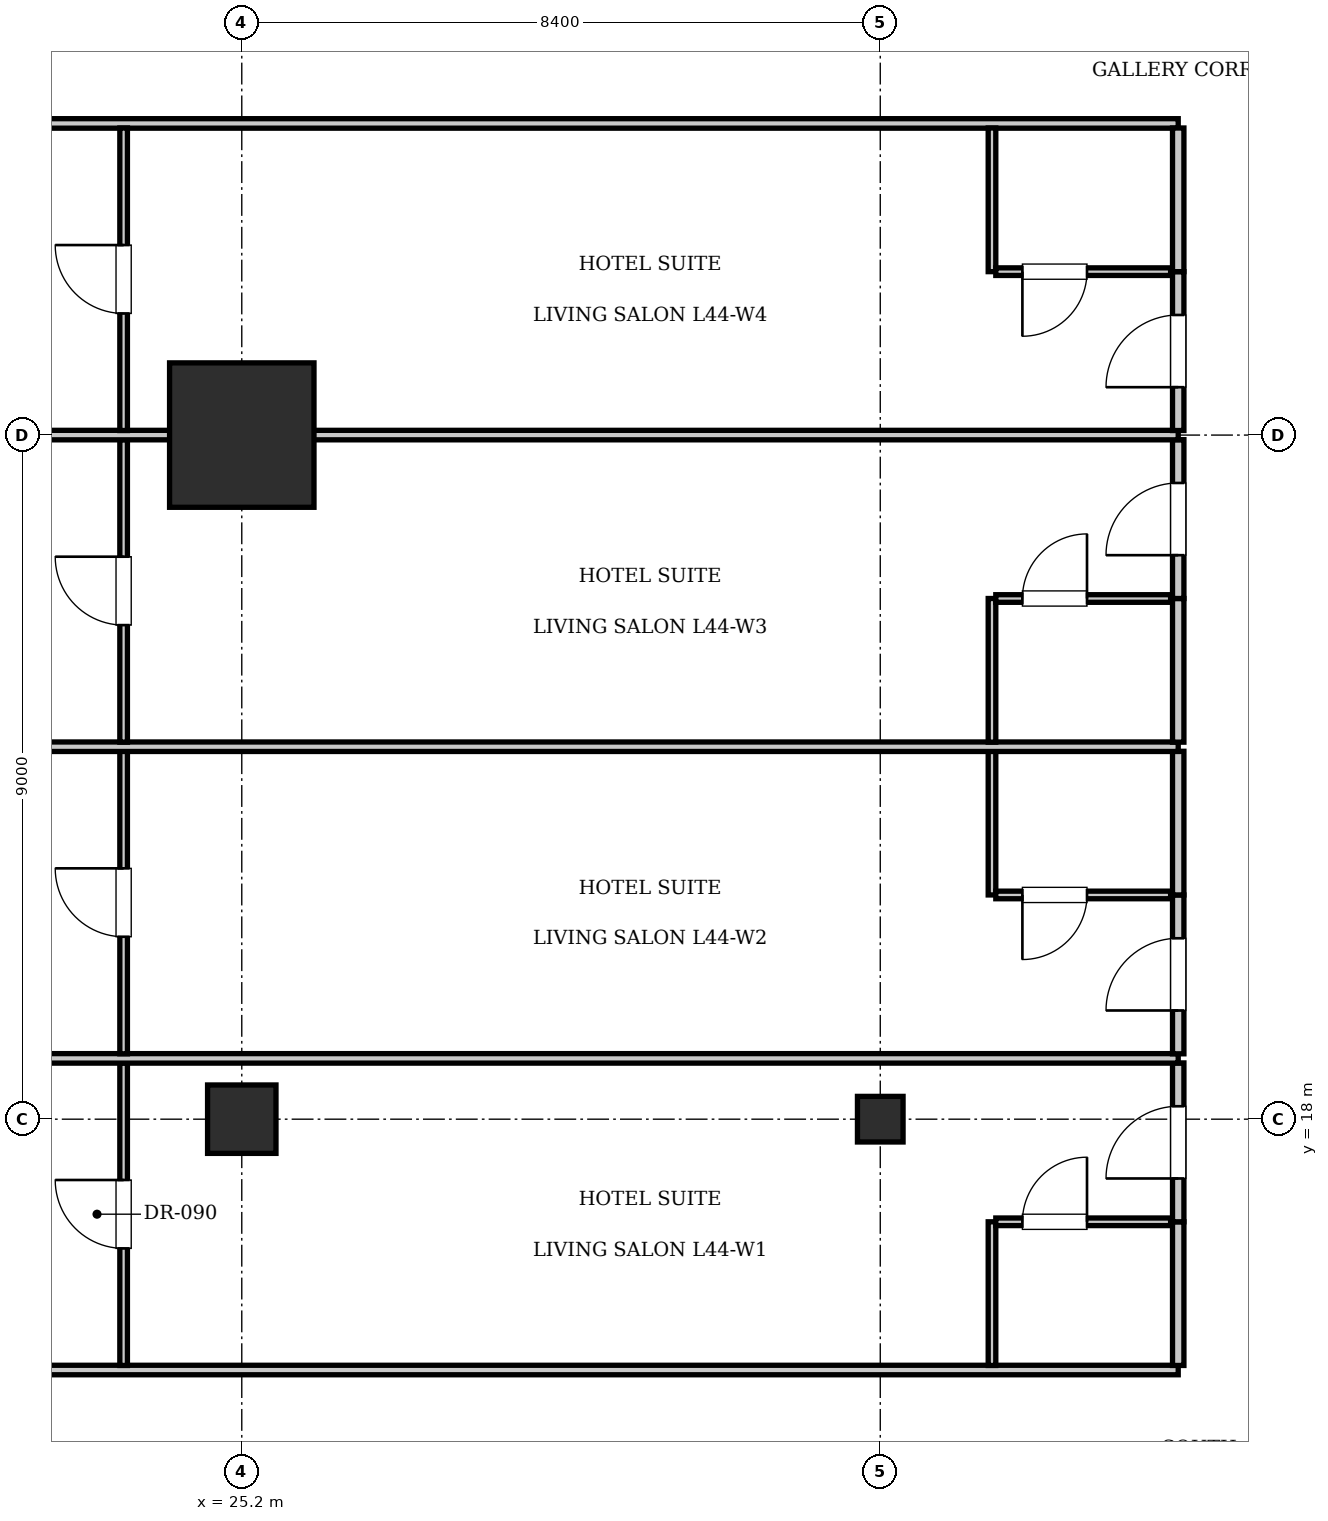
"""IFC4 building model, lengths in metres.
Left out: names, types, materials, properties, quantities, classifications, styles, units other than length and angle.
Written with IfcOpenShell. Run it as: python <this file> out.ifc"""

import sys

from ifc_helpers import new_model, si_unit, direction, frame, frame_2d, origin, origin_2d, place, context, subcontext, project, spatial, rectangle, i_section, extrude, element, fill, save


model = new_model("IFC4")
c1 = context("Model", 3, precision=1e-05, world=origin(), true_north=direction((0.0, 1.0)))
c2 = subcontext(c1, "Body", "Model", "MODEL_VIEW")
j1 = project(units=[si_unit("LENGTHUNIT", "METRE"), si_unit("PLANEANGLEUNIT", "RADIAN")], contexts=[c1])
p1 = place(None, origin())
s1 = spatial("IfcSite", under=j1, at=p1, CompositionType="ELEMENT")
p2 = place(p1, origin())
s2 = spatial("IfcBuilding", under=s1, at=p2, CompositionType="ELEMENT")
p3 = place(p2, frame((0.0, 0.0, 181.3)))
s3 = spatial("IfcBuildingStorey", under=s2, at=p3, CompositionType="ELEMENT", Elevation=181.3)
p4 = place(p3, frame((25.2, 27.0, 0.0), z_axis=(0.0, 0.0, 1.0), x_axis=(1.0, 0.0, 0.0)))
e1 = element("IfcColumn", 1, at=p4, inside=s3, PredefinedType="COLUMN", context=c2, shape_type="SweptSolid", body=[
    extrude(rectangle(XDim=1.9, YDim=1.9, at=origin_2d()), origin(), (0.0, 0.0, 1.0), 3.85),
])
p5 = place(p3, frame((25.2, 18.0, 0.0), z_axis=(0.0, 0.0, 1.0), x_axis=(1.0, 0.0, 0.0)))
e2 = element("IfcColumn", 2, at=p5, inside=s3, PredefinedType="COLUMN", context=c2, shape_type="SweptSolid", body=[
    extrude(rectangle(XDim=0.9, YDim=0.9, at=origin_2d()), origin(), (0.0, 0.0, 1.0), 3.85),
])
p6 = place(p3, frame((33.6, 18.0, 0.0), z_axis=(0.0, 0.0, 1.0), x_axis=(1.0, 0.0, 0.0)))
e3 = element("IfcColumn", 3, at=p6, inside=s3, PredefinedType="COLUMN", context=c2, shape_type="SweptSolid", body=[
    extrude(i_section(OverallWidth=0.6, OverallDepth=0.6, WebThickness=0.025, FlangeThickness=0.038, at=origin_2d()), origin(), (0.0, 0.0, 1.0), 3.85),
])
for number, where, z_axis, x_axis in (
    (4, (13.2, 14.7, 0.0), (0.0, 0.0, 1.0), (1.0, 0.0, 0.0)),
    (5, (13.2, 31.1, 0.0), (0.0, 0.0, 1.0), (1.0, 0.0, 0.0)),
):
    element("IfcWall", number, at=place(p3, frame(where, z_axis=z_axis, x_axis=x_axis)), inside=s3, PredefinedType="PARTITIONING", context=c2, shape_type="SweptSolid", body=[
        extrude(rectangle(XDim=24.32, YDim=0.125, at=frame_2d((12.16, 0.0))), origin(), (0.0, 0.0, 1.0), 3.61),
    ])
p7 = place(p3, frame((37.52, 14.76, 0.0), z_axis=(0.0, 0.0, 1.0), x_axis=(0.0, 1.0, 0.0)))
e6 = element("IfcWall", 6, at=p7, inside=s3, PredefinedType="PARTITIONING", context=c2, shape_type="SweptSolid", body=[
    extrude(rectangle(XDim=1.89, YDim=0.15, at=frame_2d((0.945, 0.0))), origin(), (0.0, 0.0, 1.0), 3.61),
])
p8 = place(p3, frame((37.52, 16.65, 0.0), z_axis=(0.0, 0.0, 1.0), x_axis=(0.0, 1.0, 0.0)))
e7 = element("IfcWall", 7, at=p8, inside=s3, PredefinedType="PARTITIONING", context=c2, shape_type="SweptSolid", body=[
    extrude(rectangle(XDim=2.09, YDim=0.15, at=frame_2d((1.045, 0.0))), origin(), (0.0, 0.0, 1.0), 3.61),
])
p9 = place(p8, frame((0.57, 0.0, 0.0)))
e8 = element("IfcOpeningElement", 8, at=p9, cuts=e7, PredefinedType="OPENING", context=c2, shape_type="SweptSolid", body=[
    extrude(rectangle(XDim=0.95, YDim=2.15, at=frame_2d((0.475, 1.075))), frame((0.0, 0.085, 0.0), z_axis=(0.0, -1.0, 0.0), x_axis=(1.0, 0.0, 0.0)), (0.0, 0.0, 1.0), 0.17),
])
p10 = place(p3, frame((35.07, 14.76, 0.0), z_axis=(0.0, 0.0, 1.0), x_axis=(0.0, 1.0, 0.0)))
e9 = element("IfcWall", 9, at=p10, inside=s3, PredefinedType="PARTITIONING", context=c2, shape_type="SweptSolid", body=[
    extrude(rectangle(XDim=1.89, YDim=0.1, at=frame_2d((0.945, 0.0))), origin(), (0.0, 0.0, 1.0), 3.61),
])
p11 = place(p3, frame((35.12, 16.65, 0.0), z_axis=(0.0, 0.0, 1.0), x_axis=(1.0, 0.0, 0.0)))
e10 = element("IfcWall", 10, at=p11, inside=s3, PredefinedType="PARTITIONING", context=c2, shape_type="SweptSolid", body=[
    extrude(rectangle(XDim=2.3, YDim=0.1, at=frame_2d((1.15, 0.0))), origin(), (0.0, 0.0, 1.0), 3.61),
])
p12 = place(p11, frame((0.35, 0.0, 0.0)))
e11 = element("IfcOpeningElement", 11, at=p12, cuts=e10, PredefinedType="OPENING", context=c2, shape_type="SweptSolid", body=[
    extrude(rectangle(XDim=0.85, YDim=2.1, at=frame_2d((0.425, 1.05))), frame((0.0, 0.06, 0.0), z_axis=(0.0, -1.0, 0.0), x_axis=(1.0, 0.0, 0.0)), (0.0, 0.0, 1.0), 0.12),
])
p13 = place(p3, frame((23.646, 14.76, 0.0), z_axis=(0.0, 0.0, 1.0), x_axis=(0.0, 1.0, 0.0)))
e12 = element("IfcWall", 12, at=p13, inside=s3, PredefinedType="PARTITIONING", context=c2, shape_type="SweptSolid", body=[
    extrude(rectangle(XDim=3.98, YDim=0.1, at=frame_2d((1.99, 0.0))), origin(), (0.0, 0.0, 1.0), 3.61),
])
p14 = place(p13, frame((1.54, 0.0, 0.0)))
e13 = element("IfcOpeningElement", 13, at=p14, cuts=e12, PredefinedType="OPENING", context=c2, shape_type="SweptSolid", body=[
    extrude(rectangle(XDim=0.9, YDim=2.1, at=frame_2d((0.45, 1.05))), frame((0.0, 0.06, 0.0), z_axis=(0.0, -1.0, 0.0), x_axis=(1.0, 0.0, 0.0)), (0.0, 0.0, 1.0), 0.12),
])
p15 = place(p3, frame((13.2, 18.8, 0.0), z_axis=(0.0, 0.0, 1.0), x_axis=(1.0, 0.0, 0.0)))
e14 = element("IfcWall", 14, at=p15, inside=s3, PredefinedType="PARTITIONING", context=c2, shape_type="SweptSolid", body=[
    extrude(rectangle(XDim=24.32, YDim=0.125, at=frame_2d((12.16, 0.0))), origin(), (0.0, 0.0, 1.0), 3.61),
])
p16 = place(p3, frame((37.52, 18.86, 0.0), z_axis=(0.0, 0.0, 1.0), x_axis=(0.0, 1.0, 0.0)))
e15 = element("IfcWall", 15, at=p16, inside=s3, PredefinedType="PARTITIONING", context=c2, shape_type="SweptSolid", body=[
    extrude(rectangle(XDim=2.09, YDim=0.15, at=frame_2d((1.045, 0.0))), origin(), (0.0, 0.0, 1.0), 3.61),
])
p17 = place(p16, frame((0.57, 0.0, 0.0)))
e16 = element("IfcOpeningElement", 16, at=p17, cuts=e15, PredefinedType="OPENING", context=c2, shape_type="SweptSolid", body=[
    extrude(rectangle(XDim=0.95, YDim=2.15, at=frame_2d((0.475, 1.075))), frame((0.0, 0.085, 0.0), z_axis=(0.0, -1.0, 0.0), x_axis=(1.0, 0.0, 0.0)), (0.0, 0.0, 1.0), 0.17),
])
p18 = place(p3, frame((37.52, 20.95, 0.0), z_axis=(0.0, 0.0, 1.0), x_axis=(0.0, 1.0, 0.0)))
e17 = element("IfcWall", 17, at=p18, inside=s3, PredefinedType="PARTITIONING", context=c2, shape_type="SweptSolid", body=[
    extrude(rectangle(XDim=1.89, YDim=0.15, at=frame_2d((0.945, 0.0))), origin(), (0.0, 0.0, 1.0), 3.61),
])
p19 = place(p3, frame((35.07, 20.95, 0.0), z_axis=(0.0, 0.0, 1.0), x_axis=(0.0, 1.0, 0.0)))
e18 = element("IfcWall", 18, at=p19, inside=s3, PredefinedType="PARTITIONING", context=c2, shape_type="SweptSolid", body=[
    extrude(rectangle(XDim=1.89, YDim=0.1, at=frame_2d((0.945, 0.0))), origin(), (0.0, 0.0, 1.0), 3.61),
])
p20 = place(p3, frame((35.12, 20.95, 0.0), z_axis=(0.0, 0.0, 1.0), x_axis=(1.0, 0.0, 0.0)))
e19 = element("IfcWall", 19, at=p20, inside=s3, PredefinedType="PARTITIONING", context=c2, shape_type="SweptSolid", body=[
    extrude(rectangle(XDim=2.3, YDim=0.1, at=frame_2d((1.15, 0.0))), origin(), (0.0, 0.0, 1.0), 3.61),
])
p21 = place(p20, frame((0.35, 0.0, 0.0)))
e20 = element("IfcOpeningElement", 20, at=p21, cuts=e19, PredefinedType="OPENING", context=c2, shape_type="SweptSolid", body=[
    extrude(rectangle(XDim=0.85, YDim=2.1, at=frame_2d((0.425, 1.05))), frame((0.0, 0.06, 0.0), z_axis=(0.0, -1.0, 0.0), x_axis=(1.0, 0.0, 0.0)), (0.0, 0.0, 1.0), 0.12),
])
p22 = place(p3, frame((23.646, 18.86, 0.0), z_axis=(0.0, 0.0, 1.0), x_axis=(0.0, 1.0, 0.0)))
e21 = element("IfcWall", 21, at=p22, inside=s3, PredefinedType="PARTITIONING", context=c2, shape_type="SweptSolid", body=[
    extrude(rectangle(XDim=3.98, YDim=0.1, at=frame_2d((1.99, 0.0))), origin(), (0.0, 0.0, 1.0), 3.61),
])
p23 = place(p22, frame((1.54, 0.0, 0.0)))
e22 = element("IfcOpeningElement", 22, at=p23, cuts=e21, PredefinedType="OPENING", context=c2, shape_type="SweptSolid", body=[
    extrude(rectangle(XDim=0.9, YDim=2.1, at=frame_2d((0.45, 1.05))), frame((0.0, 0.06, 0.0), z_axis=(0.0, -1.0, 0.0), x_axis=(1.0, 0.0, 0.0)), (0.0, 0.0, 1.0), 0.12),
])
p24 = place(p3, frame((13.2, 22.9, 0.0), z_axis=(0.0, 0.0, 1.0), x_axis=(1.0, 0.0, 0.0)))
e23 = element("IfcWall", 23, at=p24, inside=s3, PredefinedType="PARTITIONING", context=c2, shape_type="SweptSolid", body=[
    extrude(rectangle(XDim=24.32, YDim=0.125, at=frame_2d((12.16, 0.0))), origin(), (0.0, 0.0, 1.0), 3.61),
])
p25 = place(p3, frame((37.52, 22.96, 0.0), z_axis=(0.0, 0.0, 1.0), x_axis=(0.0, 1.0, 0.0)))
e24 = element("IfcWall", 24, at=p25, inside=s3, PredefinedType="PARTITIONING", context=c2, shape_type="SweptSolid", body=[
    extrude(rectangle(XDim=1.89, YDim=0.15, at=frame_2d((0.945, 0.0))), origin(), (0.0, 0.0, 1.0), 3.61),
])
p26 = place(p3, frame((37.52, 24.85, 0.0), z_axis=(0.0, 0.0, 1.0), x_axis=(0.0, 1.0, 0.0)))
e25 = element("IfcWall", 25, at=p26, inside=s3, PredefinedType="PARTITIONING", context=c2, shape_type="SweptSolid", body=[
    extrude(rectangle(XDim=2.09, YDim=0.15, at=frame_2d((1.045, 0.0))), origin(), (0.0, 0.0, 1.0), 3.61),
])
p27 = place(p26, frame((0.57, 0.0, 0.0)))
e26 = element("IfcOpeningElement", 26, at=p27, cuts=e25, PredefinedType="OPENING", context=c2, shape_type="SweptSolid", body=[
    extrude(rectangle(XDim=0.95, YDim=2.15, at=frame_2d((0.475, 1.075))), frame((0.0, 0.085, 0.0), z_axis=(0.0, -1.0, 0.0), x_axis=(1.0, 0.0, 0.0)), (0.0, 0.0, 1.0), 0.17),
])
p28 = place(p3, frame((35.07, 22.96, 0.0), z_axis=(0.0, 0.0, 1.0), x_axis=(0.0, 1.0, 0.0)))
e27 = element("IfcWall", 27, at=p28, inside=s3, PredefinedType="PARTITIONING", context=c2, shape_type="SweptSolid", body=[
    extrude(rectangle(XDim=1.89, YDim=0.1, at=frame_2d((0.945, 0.0))), origin(), (0.0, 0.0, 1.0), 3.61),
])
p29 = place(p3, frame((35.12, 24.85, 0.0), z_axis=(0.0, 0.0, 1.0), x_axis=(1.0, 0.0, 0.0)))
e28 = element("IfcWall", 28, at=p29, inside=s3, PredefinedType="PARTITIONING", context=c2, shape_type="SweptSolid", body=[
    extrude(rectangle(XDim=2.3, YDim=0.1, at=frame_2d((1.15, 0.0))), origin(), (0.0, 0.0, 1.0), 3.61),
])
p30 = place(p29, frame((0.35, 0.0, 0.0)))
e29 = element("IfcOpeningElement", 29, at=p30, cuts=e28, PredefinedType="OPENING", context=c2, shape_type="SweptSolid", body=[
    extrude(rectangle(XDim=0.85, YDim=2.1, at=frame_2d((0.425, 1.05))), frame((0.0, 0.06, 0.0), z_axis=(0.0, -1.0, 0.0), x_axis=(1.0, 0.0, 0.0)), (0.0, 0.0, 1.0), 0.12),
])
p31 = place(p3, frame((23.646, 22.96, 0.0), z_axis=(0.0, 0.0, 1.0), x_axis=(0.0, 1.0, 0.0)))
e30 = element("IfcWall", 30, at=p31, inside=s3, PredefinedType="PARTITIONING", context=c2, shape_type="SweptSolid", body=[
    extrude(rectangle(XDim=3.98, YDim=0.1, at=frame_2d((1.99, 0.0))), origin(), (0.0, 0.0, 1.0), 3.61),
])
p32 = place(p31, frame((1.54, 0.0, 0.0)))
e31 = element("IfcOpeningElement", 31, at=p32, cuts=e30, PredefinedType="OPENING", context=c2, shape_type="SweptSolid", body=[
    extrude(rectangle(XDim=0.9, YDim=2.1, at=frame_2d((0.45, 1.05))), frame((0.0, 0.06, 0.0), z_axis=(0.0, -1.0, 0.0), x_axis=(1.0, 0.0, 0.0)), (0.0, 0.0, 1.0), 0.12),
])
p33 = place(p3, frame((13.2, 27.0, 0.0), z_axis=(0.0, 0.0, 1.0), x_axis=(1.0, 0.0, 0.0)))
e32 = element("IfcWall", 32, at=p33, inside=s3, PredefinedType="PARTITIONING", context=c2, shape_type="SweptSolid", body=[
    extrude(rectangle(XDim=24.32, YDim=0.125, at=frame_2d((12.16, 0.0))), origin(), (0.0, 0.0, 1.0), 2.41),
])
p34 = place(p3, frame((37.52, 27.06, 0.0), z_axis=(0.0, 0.0, 1.0), x_axis=(0.0, 1.0, 0.0)))
e33 = element("IfcWall", 33, at=p34, inside=s3, PredefinedType="PARTITIONING", context=c2, shape_type="SweptSolid", body=[
    extrude(rectangle(XDim=2.09, YDim=0.15, at=frame_2d((1.045, 0.0))), origin(), (0.0, 0.0, 1.0), 3.61),
])
p35 = place(p34, frame((0.57, 0.0, 0.0)))
e34 = element("IfcOpeningElement", 34, at=p35, cuts=e33, PredefinedType="OPENING", context=c2, shape_type="SweptSolid", body=[
    extrude(rectangle(XDim=0.95, YDim=2.15, at=frame_2d((0.475, 1.075))), frame((0.0, 0.085, 0.0), z_axis=(0.0, -1.0, 0.0), x_axis=(1.0, 0.0, 0.0)), (0.0, 0.0, 1.0), 0.17),
])
p36 = place(p3, frame((37.52, 29.15, 0.0), z_axis=(0.0, 0.0, 1.0), x_axis=(0.0, 1.0, 0.0)))
e35 = element("IfcWall", 35, at=p36, inside=s3, PredefinedType="PARTITIONING", context=c2, shape_type="SweptSolid", body=[
    extrude(rectangle(XDim=1.89, YDim=0.15, at=frame_2d((0.945, 0.0))), origin(), (0.0, 0.0, 1.0), 3.61),
])
p37 = place(p3, frame((35.07, 29.15, 0.0), z_axis=(0.0, 0.0, 1.0), x_axis=(0.0, 1.0, 0.0)))
e36 = element("IfcWall", 36, at=p37, inside=s3, PredefinedType="PARTITIONING", context=c2, shape_type="SweptSolid", body=[
    extrude(rectangle(XDim=1.89, YDim=0.1, at=frame_2d((0.945, 0.0))), origin(), (0.0, 0.0, 1.0), 3.61),
])
p38 = place(p3, frame((35.12, 29.15, 0.0), z_axis=(0.0, 0.0, 1.0), x_axis=(1.0, 0.0, 0.0)))
e37 = element("IfcWall", 37, at=p38, inside=s3, PredefinedType="PARTITIONING", context=c2, shape_type="SweptSolid", body=[
    extrude(rectangle(XDim=2.3, YDim=0.1, at=frame_2d((1.15, 0.0))), origin(), (0.0, 0.0, 1.0), 3.61),
])
p39 = place(p38, frame((0.35, 0.0, 0.0)))
e38 = element("IfcOpeningElement", 38, at=p39, cuts=e37, PredefinedType="OPENING", context=c2, shape_type="SweptSolid", body=[
    extrude(rectangle(XDim=0.85, YDim=2.1, at=frame_2d((0.425, 1.05))), frame((0.0, 0.06, 0.0), z_axis=(0.0, -1.0, 0.0), x_axis=(1.0, 0.0, 0.0)), (0.0, 0.0, 1.0), 0.12),
])
p40 = place(p3, frame((23.646, 27.06, 0.0), z_axis=(0.0, 0.0, 1.0), x_axis=(0.0, 1.0, 0.0)))
e39 = element("IfcWall", 39, at=p40, inside=s3, PredefinedType="PARTITIONING", context=c2, shape_type="SweptSolid", body=[
    extrude(rectangle(XDim=3.98, YDim=0.1, at=frame_2d((1.99, 0.0))), origin(), (0.0, 0.0, 1.0), 3.61),
])
p41 = place(p40, frame((1.54, 0.0, 0.0)))
e40 = element("IfcOpeningElement", 40, at=p41, cuts=e39, PredefinedType="OPENING", context=c2, shape_type="SweptSolid", body=[
    extrude(rectangle(XDim=0.9, YDim=2.1, at=frame_2d((0.45, 1.05))), frame((0.0, 0.06, 0.0), z_axis=(0.0, -1.0, 0.0), x_axis=(1.0, 0.0, 0.0)), (0.0, 0.0, 1.0), 0.12),
])
p42 = place(p12, origin())
e41 = element("IfcDoor", 41, at=p42, inside=s3, OperationType="SINGLE_SWING_RIGHT", PredefinedType="DOOR", context=c2, shape_type="SweptSolid", body=[
    extrude(rectangle(XDim=0.85, YDim=2.1, at=frame_2d((0.425, 1.05))), frame((0.0, 0.025, 0.0), z_axis=(0.0, -1.0, 0.0), x_axis=(1.0, 0.0, 0.0)), (0.0, 0.0, 1.0), 0.05),
])
fill(e11, e41)
p43 = place(p9, origin())
e42 = element("IfcDoor", 42, at=p43, inside=s3, OperationType="SINGLE_SWING_LEFT", PredefinedType="DOOR", context=c2, shape_type="SweptSolid", body=[
    extrude(rectangle(XDim=0.95, YDim=2.15, at=frame_2d((0.475, 1.075))), frame((0.0, 0.025, 0.0), z_axis=(0.0, -1.0, 0.0), x_axis=(1.0, 0.0, 0.0)), (0.0, 0.0, 1.0), 0.05),
])
fill(e8, e42)
p44 = place(p14, origin())
e43 = element("IfcDoor", 43, at=p44, inside=s3, OperationType="SINGLE_SWING_RIGHT", PredefinedType="DOOR", context=c2, shape_type="SweptSolid", body=[
    extrude(rectangle(XDim=0.9, YDim=2.1, at=frame_2d((0.45, 1.05))), frame((0.0, 0.025, 0.0), z_axis=(0.0, -1.0, 0.0), x_axis=(1.0, 0.0, 0.0)), (0.0, 0.0, 1.0), 0.05),
])
fill(e13, e43)
p45 = place(p21, frame((0.85, 0.0, 0.0), z_axis=(0.0, 0.0, 1.0), x_axis=(-1.0, 0.0, 0.0)))
e44 = element("IfcDoor", 44, at=p45, inside=s3, OperationType="SINGLE_SWING_RIGHT", PredefinedType="DOOR", context=c2, shape_type="SweptSolid", body=[
    extrude(rectangle(XDim=0.85, YDim=2.1, at=frame_2d((0.425, 1.05))), frame((0.0, 0.025, 0.0), z_axis=(0.0, -1.0, 0.0), x_axis=(1.0, 0.0, 0.0)), (0.0, 0.0, 1.0), 0.05),
])
fill(e20, e44)
p46 = place(p17, origin())
e45 = element("IfcDoor", 45, at=p46, inside=s3, OperationType="SINGLE_SWING_LEFT", PredefinedType="DOOR", context=c2, shape_type="SweptSolid", body=[
    extrude(rectangle(XDim=0.95, YDim=2.15, at=frame_2d((0.475, 1.075))), frame((0.0, 0.025, 0.0), z_axis=(0.0, -1.0, 0.0), x_axis=(1.0, 0.0, 0.0)), (0.0, 0.0, 1.0), 0.05),
])
fill(e16, e45)
p47 = place(p23, origin())
e46 = element("IfcDoor", 46, at=p47, inside=s3, OperationType="SINGLE_SWING_RIGHT", PredefinedType="DOOR", context=c2, shape_type="SweptSolid", body=[
    extrude(rectangle(XDim=0.9, YDim=2.1, at=frame_2d((0.45, 1.05))), frame((0.0, 0.025, 0.0), z_axis=(0.0, -1.0, 0.0), x_axis=(1.0, 0.0, 0.0)), (0.0, 0.0, 1.0), 0.05),
])
fill(e22, e46)
p48 = place(p30, origin())
e47 = element("IfcDoor", 47, at=p48, inside=s3, OperationType="SINGLE_SWING_RIGHT", PredefinedType="DOOR", context=c2, shape_type="SweptSolid", body=[
    extrude(rectangle(XDim=0.85, YDim=2.1, at=frame_2d((0.425, 1.05))), frame((0.0, 0.025, 0.0), z_axis=(0.0, -1.0, 0.0), x_axis=(1.0, 0.0, 0.0)), (0.0, 0.0, 1.0), 0.05),
])
fill(e29, e47)
p49 = place(p27, origin())
e48 = element("IfcDoor", 48, at=p49, inside=s3, OperationType="SINGLE_SWING_LEFT", PredefinedType="DOOR", context=c2, shape_type="SweptSolid", body=[
    extrude(rectangle(XDim=0.95, YDim=2.15, at=frame_2d((0.475, 1.075))), frame((0.0, 0.025, 0.0), z_axis=(0.0, -1.0, 0.0), x_axis=(1.0, 0.0, 0.0)), (0.0, 0.0, 1.0), 0.05),
])
fill(e26, e48)
p50 = place(p32, origin())
e49 = element("IfcDoor", 49, at=p50, inside=s3, OperationType="SINGLE_SWING_RIGHT", PredefinedType="DOOR", context=c2, shape_type="SweptSolid", body=[
    extrude(rectangle(XDim=0.9, YDim=2.1, at=frame_2d((0.45, 1.05))), frame((0.0, 0.025, 0.0), z_axis=(0.0, -1.0, 0.0), x_axis=(1.0, 0.0, 0.0)), (0.0, 0.0, 1.0), 0.05),
])
fill(e31, e49)
p51 = place(p39, frame((0.85, 0.0, 0.0), z_axis=(0.0, 0.0, 1.0), x_axis=(-1.0, 0.0, 0.0)))
e50 = element("IfcDoor", 50, at=p51, inside=s3, OperationType="SINGLE_SWING_RIGHT", PredefinedType="DOOR", context=c2, shape_type="SweptSolid", body=[
    extrude(rectangle(XDim=0.85, YDim=2.1, at=frame_2d((0.425, 1.05))), frame((0.0, 0.025, 0.0), z_axis=(0.0, -1.0, 0.0), x_axis=(1.0, 0.0, 0.0)), (0.0, 0.0, 1.0), 0.05),
])
fill(e38, e50)
p52 = place(p35, origin())
e51 = element("IfcDoor", 51, at=p52, inside=s3, OperationType="SINGLE_SWING_LEFT", PredefinedType="DOOR", context=c2, shape_type="SweptSolid", body=[
    extrude(rectangle(XDim=0.95, YDim=2.15, at=frame_2d((0.475, 1.075))), frame((0.0, 0.025, 0.0), z_axis=(0.0, -1.0, 0.0), x_axis=(1.0, 0.0, 0.0)), (0.0, 0.0, 1.0), 0.05),
])
fill(e34, e51)
p53 = place(p41, origin())
e52 = element("IfcDoor", 52, at=p53, inside=s3, OperationType="SINGLE_SWING_RIGHT", PredefinedType="DOOR", context=c2, shape_type="SweptSolid", body=[
    extrude(rectangle(XDim=0.9, YDim=2.1, at=frame_2d((0.45, 1.05))), frame((0.0, 0.025, 0.0), z_axis=(0.0, -1.0, 0.0), x_axis=(1.0, 0.0, 0.0)), (0.0, 0.0, 1.0), 0.05),
])
fill(e40, e52)
save(model, sys.argv[1])
